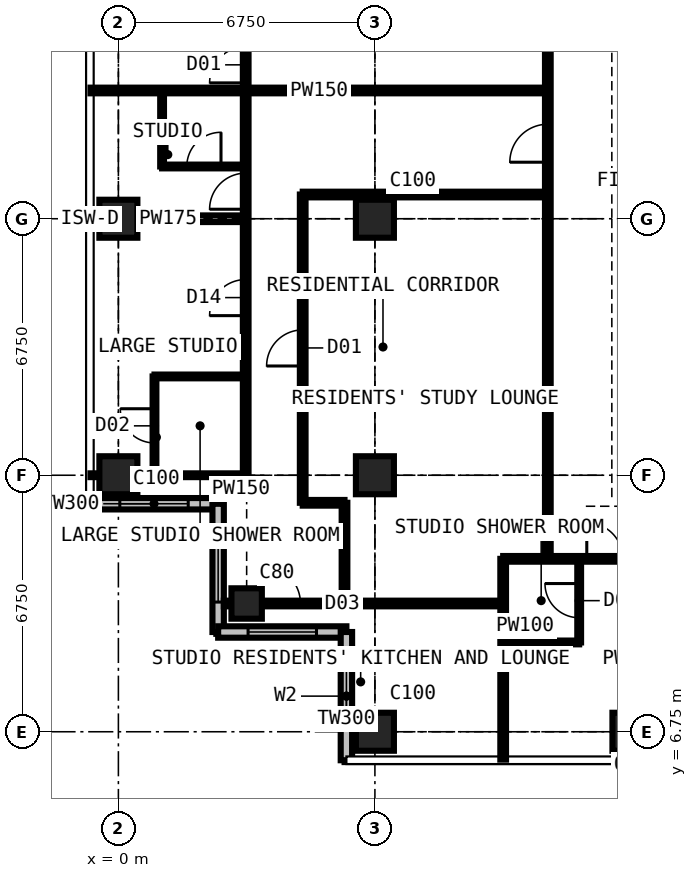
"""IFC4 building model, lengths in metres.
Left out: names, types, materials, properties, quantities, classifications, styles, units other than length and angle.
Written with IfcOpenShell. Run it as: python <this file> out.ifc"""

import sys

from ifc_helpers import new_model, si_unit, direction, frame, frame_2d, origin, origin_2d, place, context, subcontext, project, spatial, rectangle, extrude, element, fill, save


model = new_model("IFC4")
c1 = context("Model", 3, precision=1e-05, world=origin(), true_north=direction((0.0, 1.0)))
c2 = subcontext(c1, "Body", "Model", "MODEL_VIEW")
j1 = project(units=[si_unit("LENGTHUNIT", "METRE"), si_unit("PLANEANGLEUNIT", "RADIAN")], contexts=[c1])
p1 = place(None, origin())
s1 = spatial("IfcSite", under=j1, at=p1, CompositionType="ELEMENT")
p2 = place(p1, origin())
s2 = spatial("IfcBuilding", under=s1, at=p2, CompositionType="ELEMENT")
p3 = place(p2, frame((0.0, 0.0, 229.5)))
s3 = spatial("IfcBuildingStorey", under=s2, at=p3, CompositionType="ELEMENT", Elevation=229.5)
for number, where, z_axis, x_axis in (
    (1, (0.0, 13.5, 0.0), (0.0, 0.0, 1.0), (1.0, 0.0, 0.0)),
    (2, (0.0, 20.25, 0.0), (0.0, 0.0, 1.0), (1.0, 0.0, 0.0)),
):
    element("IfcColumn", number, at=place(p3, frame(where, z_axis=z_axis, x_axis=x_axis)), inside=s3, PredefinedType="COLUMN", context=c2, shape_type="SweptSolid", body=[
        extrude(rectangle(XDim=1.0, YDim=1.0, at=origin_2d()), origin(), (0.0, 0.0, 1.0), 3.6),
    ])
p4 = place(p3, frame((3.375, 10.125, 0.0), z_axis=(0.0, 0.0, 1.0), x_axis=(1.0, 0.0, 0.0)))
e3 = element("IfcColumn", 3, at=p4, inside=s3, PredefinedType="COLUMN", context=c2, shape_type="SweptSolid", body=[
    extrude(rectangle(XDim=0.8, YDim=0.8, at=origin_2d()), origin(), (0.0, 0.0, 1.0), 3.6),
])
for number, where, z_axis, x_axis in (
    (4, (6.75, 6.75, 0.0), (0.0, 0.0, 1.0), (1.0, 0.0, 0.0)),
    (5, (6.75, 13.5, 0.0), (0.0, 0.0, 1.0), (1.0, 0.0, 0.0)),
    (6, (6.75, 20.25, 0.0), (0.0, 0.0, 1.0), (1.0, 0.0, 0.0)),
    (7, (13.5, 6.75, 0.0), (0.0, 0.0, 1.0), (1.0, 0.0, 0.0)),
):
    element("IfcColumn", number, at=place(p3, frame(where, z_axis=z_axis, x_axis=x_axis)), inside=s3, PredefinedType="COLUMN", context=c2, shape_type="SweptSolid", body=[
        extrude(rectangle(XDim=1.0, YDim=1.0, at=origin_2d()), origin(), (0.0, 0.0, 1.0), 3.6),
    ])
p5 = place(p3, frame((-0.75, 12.75, 0.0), z_axis=(0.0, 0.0, 1.0), x_axis=(1.0, 0.0, 0.0)))
e8 = element("IfcWall", 8, at=p5, inside=s3, PredefinedType="SOLIDWALL", context=c2, shape_type="SweptSolid", body=[
    extrude(rectangle(XDim=3.375, YDim=0.3, at=frame_2d((1.688, 0.0))), origin(), (0.0, 0.0, 1.0), 3.375),
])
p6 = place(p5, frame((0.788, 0.0, 0.6)))
e9 = element("IfcOpeningElement", 9, at=p6, cuts=e8, PredefinedType="OPENING", context=c2, shape_type="SweptSolid", body=[
    extrude(rectangle(XDim=1.8, YDim=2.1, at=frame_2d((0.9, 1.05))), frame((0.0, 0.16, 0.0), z_axis=(0.0, -1.0, 0.0), x_axis=(1.0, 0.0, 0.0)), (0.0, 0.0, 1.0), 0.32),
])
p7 = place(p3, frame((2.625, 12.75, 0.0), z_axis=(0.0, 0.0, 1.0), x_axis=(0.0, -1.0, 0.0)))
e10 = element("IfcWall", 10, at=p7, inside=s3, PredefinedType="SOLIDWALL", context=c2, shape_type="SweptSolid", body=[
    extrude(rectangle(XDim=3.375, YDim=0.3, at=frame_2d((1.688, 0.0))), origin(), (0.0, 0.0, 1.0), 3.375),
])
p8 = place(p7, frame((0.788, 0.0, 0.6)))
e11 = element("IfcOpeningElement", 11, at=p8, cuts=e10, PredefinedType="OPENING", context=c2, shape_type="SweptSolid", body=[
    extrude(rectangle(XDim=1.8, YDim=2.1, at=frame_2d((0.9, 1.05))), frame((0.0, 0.16, 0.0), z_axis=(0.0, -1.0, 0.0), x_axis=(1.0, 0.0, 0.0)), (0.0, 0.0, 1.0), 0.32),
])
p9 = place(p3, frame((2.625, 9.375, 0.0), z_axis=(0.0, 0.0, 1.0), x_axis=(1.0, 0.0, 0.0)))
e12 = element("IfcWall", 12, at=p9, inside=s3, PredefinedType="SOLIDWALL", context=c2, shape_type="SweptSolid", body=[
    extrude(rectangle(XDim=3.375, YDim=0.3, at=frame_2d((1.688, 0.0))), origin(), (0.0, 0.0, 1.0), 3.375),
])
p10 = place(p9, frame((0.788, 0.0, 0.6)))
e13 = element("IfcOpeningElement", 13, at=p10, cuts=e12, PredefinedType="OPENING", context=c2, shape_type="SweptSolid", body=[
    extrude(rectangle(XDim=1.8, YDim=2.1, at=frame_2d((0.9, 1.05))), frame((0.0, 0.16, 0.0), z_axis=(0.0, -1.0, 0.0), x_axis=(1.0, 0.0, 0.0)), (0.0, 0.0, 1.0), 0.32),
])
p11 = place(p3, frame((6.0, 9.375, 0.0), z_axis=(0.0, 0.0, 1.0), x_axis=(0.0, -1.0, 0.0)))
e14 = element("IfcWall", 14, at=p11, inside=s3, PredefinedType="SOLIDWALL", context=c2, shape_type="SweptSolid", body=[
    extrude(rectangle(XDim=3.375, YDim=0.3, at=frame_2d((1.688, 0.0))), origin(), (0.0, 0.0, 1.0), 3.375),
])
p12 = place(p11, frame((0.788, 0.0, 0.6)))
e15 = element("IfcOpeningElement", 15, at=p12, cuts=e14, PredefinedType="OPENING", context=c2, shape_type="SweptSolid", body=[
    extrude(rectangle(XDim=1.8, YDim=2.1, at=frame_2d((0.9, 1.05))), frame((0.0, 0.16, 0.0), z_axis=(0.0, -1.0, 0.0), x_axis=(1.0, 0.0, 0.0)), (0.0, 0.0, 1.0), 0.32),
])
p13 = place(p3, frame((-0.734, 13.5, 0.0), z_axis=(0.0, 0.0, 1.0), x_axis=(1.0, 0.0, 0.0)))
e16 = element("IfcWall", 16, at=p13, inside=s3, PredefinedType="PARTITIONING", context=c2, shape_type="SweptSolid", body=[
    extrude(rectangle(XDim=4.084, YDim=0.1, at=frame_2d((2.042, 0.0))), origin(), (0.0, 0.0, 1.0), 2.877),
])
p14 = place(p3, frame((-0.734, 20.25, 0.0), z_axis=(0.0, 0.0, 1.0), x_axis=(1.0, 0.0, 0.0)))
e17 = element("IfcWall", 17, at=p14, inside=s3, PredefinedType="PARTITIONING", context=c2, shape_type="SweptSolid", body=[
    extrude(rectangle(XDim=4.084, YDim=0.175, at=frame_2d((2.042, 0.0))), origin(), (0.0, 0.0, 1.0), 2.877),
])
p15 = place(p3, frame((-0.734, 23.625, 0.0), z_axis=(0.0, 0.0, 1.0), x_axis=(1.0, 0.0, 0.0)))
e18 = element("IfcWall", 18, at=p15, inside=s3, PredefinedType="PARTITIONING", context=c2, shape_type="SweptSolid", body=[
    extrude(rectangle(XDim=12.034, YDim=0.15, at=frame_2d((6.017, 0.0))), origin(), (0.0, 0.0, 1.0), 3.375),
])
p16 = place(p3, frame((0.95, 13.5, 0.0), z_axis=(0.0, 0.0, 1.0), x_axis=(0.0, 1.0, 0.0)))
e19 = element("IfcWall", 19, at=p16, inside=s3, PredefinedType="PARTITIONING", context=c2, shape_type="SweptSolid", body=[
    extrude(rectangle(XDim=2.6, YDim=0.1, at=frame_2d((1.3, 0.0))), origin(), (0.0, 0.0, 1.0), 3.375),
])
p17 = place(p16, frame((0.85, 0.0, 0.0)))
e20 = element("IfcOpeningElement", 20, at=p17, cuts=e19, PredefinedType="OPENING", context=c2, shape_type="SweptSolid", body=[
    extrude(rectangle(XDim=0.9, YDim=2.2, at=frame_2d((0.45, 1.1))), frame((0.0, 0.06, 0.0), z_axis=(0.0, -1.0, 0.0), x_axis=(1.0, 0.0, 0.0)), (0.0, 0.0, 1.0), 0.12),
])
p18 = place(p3, frame((0.95, 16.1, 0.0), z_axis=(0.0, 0.0, 1.0), x_axis=(1.0, 0.0, 0.0)))
e21 = element("IfcWall", 21, at=p18, inside=s3, PredefinedType="PARTITIONING", context=c2, shape_type="SweptSolid", body=[
    extrude(rectangle(XDim=2.4, YDim=0.1, at=frame_2d((1.2, 0.0))), origin(), (0.0, 0.0, 1.0), 3.375),
])
p19 = place(p3, frame((1.15, 21.625, 0.0), z_axis=(0.0, 0.0, 1.0), x_axis=(0.0, 1.0, 0.0)))
e22 = element("IfcWall", 22, at=p19, inside=s3, PredefinedType="PARTITIONING", context=c2, shape_type="SweptSolid", body=[
    extrude(rectangle(XDim=2.0, YDim=0.1, at=frame_2d((1.0, 0.0))), origin(), (0.0, 0.0, 1.0), 3.375),
])
p20 = place(p3, frame((1.15, 21.625, 0.0), z_axis=(0.0, 0.0, 1.0), x_axis=(1.0, 0.0, 0.0)))
e23 = element("IfcWall", 23, at=p20, inside=s3, PredefinedType="PARTITIONING", context=c2, shape_type="SweptSolid", body=[
    extrude(rectangle(XDim=2.2, YDim=0.1, at=frame_2d((1.1, 0.0))), origin(), (0.0, 0.0, 1.0), 3.375),
])
p21 = place(p20, frame((0.65, 0.0, 0.0)))
e24 = element("IfcOpeningElement", 24, at=p21, cuts=e23, PredefinedType="OPENING", context=c2, shape_type="SweptSolid", body=[
    extrude(rectangle(XDim=0.9, YDim=2.2, at=frame_2d((0.45, 1.1))), frame((0.0, 0.06, 0.0), z_axis=(0.0, -1.0, 0.0), x_axis=(1.0, 0.0, 0.0)), (0.0, 0.0, 1.0), 0.12),
])
p22 = place(p3, frame((2.625, 12.766, 0.0), z_axis=(0.0, 0.0, 1.0), x_axis=(0.0, 1.0, 0.0)))
e25 = element("IfcWall", 25, at=p22, inside=s3, PredefinedType="PARTITIONING", context=c2, shape_type="SweptSolid", body=[
    extrude(rectangle(XDim=0.734, YDim=0.15, at=frame_2d((0.367, 0.0))), origin(), (0.0, 0.0, 1.0), 3.375),
])
p23 = place(p3, frame((2.775, 10.125, 0.0), z_axis=(0.0, 0.0, 1.0), x_axis=(1.0, 0.0, 0.0)))
e26 = element("IfcWall", 26, at=p23, inside=s3, PredefinedType="PARTITIONING", context=c2, shape_type="SweptSolid", body=[
    extrude(rectangle(XDim=7.35, YDim=0.15, at=frame_2d((3.675, 0.0))), origin(), (0.0, 0.0, 1.0), 2.877),
])
p24 = place(p23, frame((1.016, 0.0, 0.0)))
e27 = element("IfcOpeningElement", 27, at=p24, cuts=e26, PredefinedType="OPENING", context=c2, shape_type="SweptSolid", body=[
    extrude(rectangle(XDim=1.0, YDim=2.2, at=frame_2d((0.5, 1.1))), frame((0.0, 0.085, 0.0), z_axis=(0.0, -1.0, 0.0), x_axis=(1.0, 0.0, 0.0)), (0.0, 0.0, 1.0), 0.17),
])
p25 = place(p3, frame((3.35, 13.5, 0.0), z_axis=(0.0, 0.0, 1.0), x_axis=(0.0, 1.0, 0.0)))
e28 = element("IfcWall", 28, at=p25, inside=s3, PredefinedType="PARTITIONING", context=c2, shape_type="SweptSolid", body=[
    extrude(rectangle(XDim=13.5, YDim=0.15, at=frame_2d((6.75, 0.0))), origin(), (0.0, 0.0, 1.0), 3.375),
])
p26 = place(p25, frame((10.325, 0.0, 0.0)))
e29 = element("IfcOpeningElement", 29, at=p26, cuts=e28, PredefinedType="OPENING", context=c2, shape_type="SweptSolid", body=[
    extrude(rectangle(XDim=0.95, YDim=2.2, at=frame_2d((0.475, 1.1))), frame((0.0, 0.085, 0.0), z_axis=(0.0, -1.0, 0.0), x_axis=(1.0, 0.0, 0.0)), (0.0, 0.0, 1.0), 0.17),
])
p27 = place(p25, frame((4.2, 0.0, 0.0)))
e30 = element("IfcOpeningElement", 30, at=p27, cuts=e28, PredefinedType="OPENING", context=c2, shape_type="SweptSolid", body=[
    extrude(rectangle(XDim=0.95, YDim=2.2, at=frame_2d((0.475, 1.1))), frame((0.0, 0.085, 0.0), z_axis=(0.0, -1.0, 0.0), x_axis=(1.0, 0.0, 0.0)), (0.0, 0.0, 1.0), 0.17),
])
p28 = place(p25, frame((7.0, 0.0, 0.0)))
e31 = element("IfcOpeningElement", 31, at=p28, cuts=e28, PredefinedType="OPENING", context=c2, shape_type="SweptSolid", body=[
    extrude(rectangle(XDim=0.95, YDim=2.2, at=frame_2d((0.475, 1.1))), frame((0.0, 0.085, 0.0), z_axis=(0.0, -1.0, 0.0), x_axis=(1.0, 0.0, 0.0)), (0.0, 0.0, 1.0), 0.17),
])
p29 = place(p3, frame((4.85, 12.775, 0.0), z_axis=(0.0, 0.0, 1.0), x_axis=(0.0, 1.0, 0.0)))
e32 = element("IfcWall", 32, at=p29, inside=s3, PredefinedType="PARTITIONING", context=c2, shape_type="SweptSolid", body=[
    extrude(rectangle(XDim=8.113, YDim=0.15, at=frame_2d((4.056, 0.0))), origin(), (0.0, 0.0, 1.0), 3.375),
])
p30 = place(p29, frame((3.6, 0.0, 0.0)))
e33 = element("IfcOpeningElement", 33, at=p30, cuts=e32, PredefinedType="OPENING", context=c2, shape_type="SweptSolid", body=[
    extrude(rectangle(XDim=0.95, YDim=2.2, at=frame_2d((0.475, 1.1))), frame((0.0, 0.085, 0.0), z_axis=(0.0, -1.0, 0.0), x_axis=(1.0, 0.0, 0.0)), (0.0, 0.0, 1.0), 0.17),
])
p31 = place(p3, frame((4.85, 12.775, 0.0), z_axis=(0.0, 0.0, 1.0), x_axis=(1.0, 0.0, 0.0)))
e34 = element("IfcWall", 34, at=p31, inside=s3, PredefinedType="PARTITIONING", context=c2, shape_type="SweptSolid", body=[
    extrude(rectangle(XDim=1.1, YDim=0.15, at=frame_2d((0.55, 0.0))), origin(), (0.0, 0.0, 1.0), 3.375),
])
p32 = place(p3, frame((4.85, 20.887, 0.0), z_axis=(0.0, 0.0, 1.0), x_axis=(1.0, 0.0, 0.0)))
e35 = element("IfcWall", 35, at=p32, inside=s3, PredefinedType="PARTITIONING", context=c2, shape_type="SweptSolid", body=[
    extrude(rectangle(XDim=6.45, YDim=0.15, at=frame_2d((3.225, 0.0))), origin(), (0.0, 0.0, 1.0), 3.375),
])
p33 = place(p3, frame((5.95, 10.125, 0.0), z_axis=(0.0, 0.0, 1.0), x_axis=(0.0, 1.0, 0.0)))
e36 = element("IfcWall", 36, at=p33, inside=s3, PredefinedType="PARTITIONING", context=c2, shape_type="SweptSolid", body=[
    extrude(rectangle(XDim=2.65, YDim=0.15, at=frame_2d((1.325, 0.0))), origin(), (0.0, 0.0, 1.0), 3.375),
])
p34 = place(p3, frame((10.125, 6.016, 0.0), z_axis=(0.0, 0.0, 1.0), x_axis=(0.0, 1.0, 0.0)))
e37 = element("IfcWall", 37, at=p34, inside=s3, PredefinedType="PARTITIONING", context=c2, shape_type="SweptSolid", body=[
    extrude(rectangle(XDim=5.284, YDim=0.15, at=frame_2d((2.642, 0.0))), origin(), (0.0, 0.0, 1.0), 3.375),
])
p35 = place(p3, frame((10.125, 9.1, 0.0), z_axis=(0.0, 0.0, 1.0), x_axis=(1.0, 0.0, 0.0)))
e38 = element("IfcWall", 38, at=p35, inside=s3, PredefinedType="PARTITIONING", context=c2, shape_type="SweptSolid", body=[
    extrude(rectangle(XDim=2.0, YDim=0.1, at=frame_2d((1.0, 0.0))), origin(), (0.0, 0.0, 1.0), 3.375),
])
p36 = place(p3, frame((10.125, 11.3, 0.0), z_axis=(0.0, 0.0, 1.0), x_axis=(1.0, 0.0, 0.0)))
e39 = element("IfcWall", 39, at=p36, inside=s3, PredefinedType="PARTITIONING", context=c2, shape_type="SweptSolid", body=[
    extrude(rectangle(XDim=20.25, YDim=0.15, at=frame_2d((10.125, 0.0))), origin(), (0.0, 0.0, 1.0), 3.375),
])
p37 = place(p36, frame((11.725, 0.0, 0.0)))
e40 = element("IfcOpeningElement", 40, at=p37, cuts=e39, PredefinedType="OPENING", context=c2, shape_type="SweptSolid", body=[
    extrude(rectangle(XDim=0.95, YDim=2.2, at=frame_2d((0.475, 1.1))), frame((0.0, 0.085, 0.0), z_axis=(0.0, -1.0, 0.0), x_axis=(1.0, 0.0, 0.0)), (0.0, 0.0, 1.0), 0.17),
])
p38 = place(p36, frame((4.975, 0.0, 0.0)))
e41 = element("IfcOpeningElement", 41, at=p38, cuts=e39, PredefinedType="OPENING", context=c2, shape_type="SweptSolid", body=[
    extrude(rectangle(XDim=0.95, YDim=2.2, at=frame_2d((0.475, 1.1))), frame((0.0, 0.085, 0.0), z_axis=(0.0, -1.0, 0.0), x_axis=(1.0, 0.0, 0.0)), (0.0, 0.0, 1.0), 0.17),
])
p39 = place(p36, frame((2.2, 0.0, 0.0)))
e42 = element("IfcOpeningElement", 42, at=p39, cuts=e39, PredefinedType="OPENING", context=c2, shape_type="SweptSolid", body=[
    extrude(rectangle(XDim=0.95, YDim=2.2, at=frame_2d((0.475, 1.1))), frame((0.0, 0.085, 0.0), z_axis=(0.0, -1.0, 0.0), x_axis=(1.0, 0.0, 0.0)), (0.0, 0.0, 1.0), 0.17),
])
p40 = place(p36, frame((17.475, 0.0, 0.0)))
e43 = element("IfcOpeningElement", 43, at=p40, cuts=e39, PredefinedType="OPENING", context=c2, shape_type="SweptSolid", body=[
    extrude(rectangle(XDim=1.0, YDim=2.2, at=frame_2d((0.5, 1.1))), frame((0.0, 0.085, 0.0), z_axis=(0.0, -1.0, 0.0), x_axis=(1.0, 0.0, 0.0)), (0.0, 0.0, 1.0), 0.17),
])
p41 = place(p3, frame((11.3, 11.3, 0.0), z_axis=(0.0, 0.0, 1.0), x_axis=(0.0, 1.0, 0.0)))
e44 = element("IfcWall", 44, at=p41, inside=s3, PredefinedType="PARTITIONING", context=c2, shape_type="SweptSolid", body=[
    extrude(rectangle(XDim=19.3, YDim=0.15, at=frame_2d((9.65, 0.0))), origin(), (0.0, 0.0, 1.0), 3.375),
])
p42 = place(p41, frame((13.525, 0.0, 0.0)))
e45 = element("IfcOpeningElement", 45, at=p42, cuts=e44, PredefinedType="OPENING", context=c2, shape_type="SweptSolid", body=[
    extrude(rectangle(XDim=1.0, YDim=2.2, at=frame_2d((0.5, 1.1))), frame((0.0, 0.085, 0.0), z_axis=(0.0, -1.0, 0.0), x_axis=(1.0, 0.0, 0.0)), (0.0, 0.0, 1.0), 0.17),
])
p43 = place(p41, frame((10.438, 0.0, 0.0)))
e46 = element("IfcOpeningElement", 46, at=p43, cuts=e44, PredefinedType="OPENING", context=c2, shape_type="SweptSolid", body=[
    extrude(rectangle(XDim=1.0, YDim=2.2, at=frame_2d((0.5, 1.1))), frame((0.0, 0.085, 0.0), z_axis=(0.0, -1.0, 0.0), x_axis=(1.0, 0.0, 0.0)), (0.0, 0.0, 1.0), 0.17),
])
p44 = place(p3, frame((12.125, 9.1, 0.0), z_axis=(0.0, 0.0, 1.0), x_axis=(0.0, 1.0, 0.0)))
e47 = element("IfcWall", 47, at=p44, inside=s3, PredefinedType="PARTITIONING", context=c2, shape_type="SweptSolid", body=[
    extrude(rectangle(XDim=2.2, YDim=0.1, at=frame_2d((1.1, 0.0))), origin(), (0.0, 0.0, 1.0), 3.375),
])
p45 = place(p44, frame((0.65, 0.0, 0.0)))
e48 = element("IfcOpeningElement", 48, at=p45, cuts=e47, PredefinedType="OPENING", context=c2, shape_type="SweptSolid", body=[
    extrude(rectangle(XDim=0.9, YDim=2.2, at=frame_2d((0.45, 1.1))), frame((0.0, 0.06, 0.0), z_axis=(0.0, -1.0, 0.0), x_axis=(1.0, 0.0, 0.0)), (0.0, 0.0, 1.0), 0.12),
])
p46 = place(p6, origin())
e49 = element("IfcWindow", 49, at=p46, inside=s3, PartitioningType="SINGLE_PANEL", PredefinedType="WINDOW", context=c2, shape_type="SweptSolid", body=[
    extrude(rectangle(XDim=1.8, YDim=2.1, at=frame_2d((0.9, 1.05))), frame((0.0, 0.03, 0.0), z_axis=(0.0, -1.0, 0.0), x_axis=(1.0, 0.0, 0.0)), (0.0, 0.0, 1.0), 0.06),
])
fill(e9, e49)
p47 = place(p8, origin())
e50 = element("IfcWindow", 50, at=p47, inside=s3, PartitioningType="SINGLE_PANEL", PredefinedType="WINDOW", context=c2, shape_type="SweptSolid", body=[
    extrude(rectangle(XDim=1.8, YDim=2.1, at=frame_2d((0.9, 1.05))), frame((0.0, 0.03, 0.0), z_axis=(0.0, -1.0, 0.0), x_axis=(1.0, 0.0, 0.0)), (0.0, 0.0, 1.0), 0.06),
])
fill(e11, e50)
p48 = place(p10, origin())
e51 = element("IfcWindow", 51, at=p48, inside=s3, PartitioningType="SINGLE_PANEL", PredefinedType="WINDOW", context=c2, shape_type="SweptSolid", body=[
    extrude(rectangle(XDim=1.8, YDim=2.1, at=frame_2d((0.9, 1.05))), frame((0.0, 0.03, 0.0), z_axis=(0.0, -1.0, 0.0), x_axis=(1.0, 0.0, 0.0)), (0.0, 0.0, 1.0), 0.06),
])
fill(e13, e51)
p49 = place(p12, origin())
e52 = element("IfcWindow", 52, at=p49, inside=s3, PartitioningType="SINGLE_PANEL", PredefinedType="WINDOW", context=c2, shape_type="SweptSolid", body=[
    extrude(rectangle(XDim=1.8, YDim=2.1, at=frame_2d((0.9, 1.05))), frame((0.0, 0.03, 0.0), z_axis=(0.0, -1.0, 0.0), x_axis=(1.0, 0.0, 0.0)), (0.0, 0.0, 1.0), 0.06),
])
fill(e15, e52)
p50 = place(p24, origin())
e53 = element("IfcDoor", 53, at=p50, inside=s3, OperationType="SINGLE_SWING_LEFT", PredefinedType="DOOR", context=c2, shape_type="SweptSolid", body=[
    extrude(rectangle(XDim=1.0, YDim=2.2, at=frame_2d((0.5, 1.1))), frame((0.0, 0.025, 0.0), z_axis=(0.0, -1.0, 0.0), x_axis=(1.0, 0.0, 0.0)), (0.0, 0.0, 1.0), 0.05),
])
fill(e27, e53)
p51 = place(p39, origin())
e54 = element("IfcDoor", 54, at=p51, inside=s3, OperationType="SINGLE_SWING_LEFT", PredefinedType="DOOR", context=c2, shape_type="SweptSolid", body=[
    extrude(rectangle(XDim=0.95, YDim=2.2, at=frame_2d((0.475, 1.1))), frame((0.0, 0.025, 0.0), z_axis=(0.0, -1.0, 0.0), x_axis=(1.0, 0.0, 0.0)), (0.0, 0.0, 1.0), 0.05),
])
fill(e42, e54)
p52 = place(p45, origin())
e55 = element("IfcDoor", 55, at=p52, inside=s3, OperationType="SINGLE_SWING_RIGHT", PredefinedType="DOOR", context=c2, shape_type="SweptSolid", body=[
    extrude(rectangle(XDim=0.9, YDim=2.2, at=frame_2d((0.45, 1.1))), frame((0.0, 0.025, 0.0), z_axis=(0.0, -1.0, 0.0), x_axis=(1.0, 0.0, 0.0)), (0.0, 0.0, 1.0), 0.05),
])
fill(e48, e55)
p53 = place(p26, origin())
e56 = element("IfcDoor", 56, at=p53, inside=s3, OperationType="SINGLE_SWING_LEFT", PredefinedType="DOOR", context=c2, shape_type="SweptSolid", body=[
    extrude(rectangle(XDim=0.95, YDim=2.2, at=frame_2d((0.475, 1.1))), frame((0.0, 0.025, 0.0), z_axis=(0.0, -1.0, 0.0), x_axis=(1.0, 0.0, 0.0)), (0.0, 0.0, 1.0), 0.05),
])
fill(e29, e56)
p54 = place(p27, origin())
e57 = element("IfcDoor", 57, at=p54, inside=s3, OperationType="SINGLE_SWING_LEFT", PredefinedType="DOOR", context=c2, shape_type="SweptSolid", body=[
    extrude(rectangle(XDim=0.95, YDim=2.2, at=frame_2d((0.475, 1.1))), frame((0.0, 0.025, 0.0), z_axis=(0.0, -1.0, 0.0), x_axis=(1.0, 0.0, 0.0)), (0.0, 0.0, 1.0), 0.05),
])
fill(e30, e57)
p55 = place(p17, origin())
e58 = element("IfcDoor", 58, at=p55, inside=s3, OperationType="SINGLE_SWING_RIGHT", PredefinedType="DOOR", context=c2, shape_type="SweptSolid", body=[
    extrude(rectangle(XDim=0.9, YDim=2.2, at=frame_2d((0.45, 1.1))), frame((0.0, 0.025, 0.0), z_axis=(0.0, -1.0, 0.0), x_axis=(1.0, 0.0, 0.0)), (0.0, 0.0, 1.0), 0.05),
])
fill(e20, e58)
p56 = place(p28, origin())
e59 = element("IfcDoor", 59, at=p56, inside=s3, OperationType="SINGLE_SWING_LEFT", PredefinedType="DOOR", context=c2, shape_type="SweptSolid", body=[
    extrude(rectangle(XDim=0.95, YDim=2.2, at=frame_2d((0.475, 1.1))), frame((0.0, 0.025, 0.0), z_axis=(0.0, -1.0, 0.0), x_axis=(1.0, 0.0, 0.0)), (0.0, 0.0, 1.0), 0.05),
])
fill(e31, e59)
p57 = place(p21, origin())
e60 = element("IfcDoor", 60, at=p57, inside=s3, OperationType="SINGLE_SWING_RIGHT", PredefinedType="DOOR", context=c2, shape_type="SweptSolid", body=[
    extrude(rectangle(XDim=0.9, YDim=2.2, at=frame_2d((0.45, 1.1))), frame((0.0, 0.025, 0.0), z_axis=(0.0, -1.0, 0.0), x_axis=(1.0, 0.0, 0.0)), (0.0, 0.0, 1.0), 0.05),
])
fill(e24, e60)
p58 = place(p43, origin())
e61 = element("IfcDoor", 61, at=p58, inside=s3, OperationType="SINGLE_SWING_LEFT", PredefinedType="DOOR", context=c2, shape_type="SweptSolid", body=[
    extrude(rectangle(XDim=1.0, YDim=2.2, at=frame_2d((0.5, 1.1))), frame((0.0, 0.025, 0.0), z_axis=(0.0, -1.0, 0.0), x_axis=(1.0, 0.0, 0.0)), (0.0, 0.0, 1.0), 0.05),
])
fill(e46, e61)
p59 = place(p30, origin())
e62 = element("IfcDoor", 62, at=p59, inside=s3, OperationType="SINGLE_SWING_LEFT", PredefinedType="DOOR", context=c2, shape_type="SweptSolid", body=[
    extrude(rectangle(XDim=0.95, YDim=2.2, at=frame_2d((0.475, 1.1))), frame((0.0, 0.025, 0.0), z_axis=(0.0, -1.0, 0.0), x_axis=(1.0, 0.0, 0.0)), (0.0, 0.0, 1.0), 0.05),
])
fill(e33, e62)
save(model, sys.argv[1])
